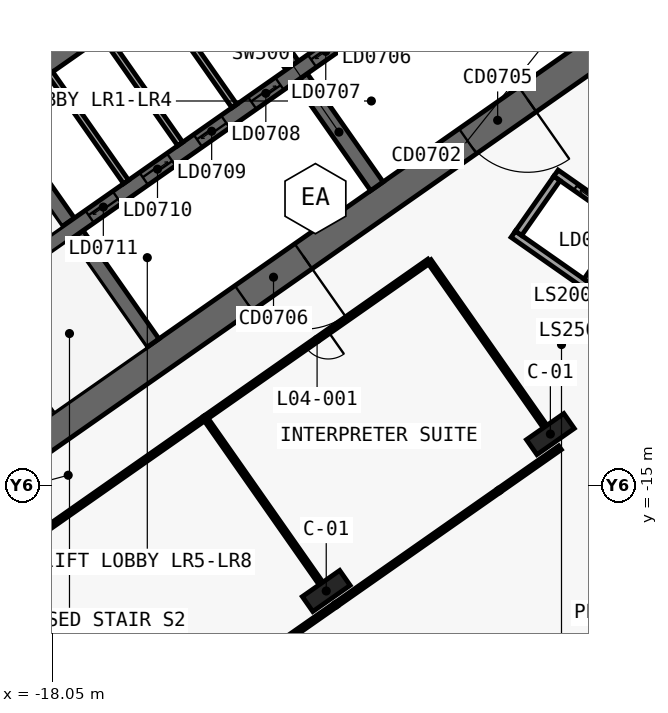
"""IFC4 building model, lengths in metres.
Left out: names, types, materials, properties, quantities, classifications, styles, units other than length and angle.
Written with IfcOpenShell. Run it as: python <this file> out.ifc"""

import sys

from ifc_helpers import new_model, si_unit, direction, frame, frame_2d, origin, origin_2d, place, context, subcontext, project, spatial, polyline, rectangle, outline, extrude, element, fill, save


model = new_model("IFC4")
c1 = context("Model", 3, precision=1e-05, world=origin(), true_north=direction((0.0, 1.0)))
c2 = subcontext(c1, "Body", "Model", "MODEL_VIEW")
j1 = project(units=[si_unit("LENGTHUNIT", "METRE"), si_unit("PLANEANGLEUNIT", "RADIAN")], contexts=[c1])
p1 = place(None, origin())
s1 = spatial("IfcSite", under=j1, at=p1, CompositionType="ELEMENT")
p2 = place(p1, origin())
s2 = spatial("IfcBuilding", under=s1, at=p2, CompositionType="ELEMENT")
p3 = place(p2, frame((0.0, 0.0, 32.0)))
s3 = spatial("IfcBuildingStorey", under=s2, at=p3, CompositionType="ELEMENT", Elevation=32.0)
p4 = place(p3, frame((0.037, 11.867, 0.0), z_axis=(0.0, 0.0, 1.0), x_axis=(-0.819155306259, -0.573571777746, 0.0)))
e1 = element("IfcWall", 1, at=p4, inside=s3, PredefinedType="SHEAR", context=c2, shape_type="SweptSolid", body=[
    extrude(outline(polyline([(33.837, 0.5), (0.7, 0.5), (0.0, -0.5), (33.837, -0.5), (33.837, 0.5)])), origin(), (0.0, 0.0, 1.0), 5.5),
])
p5 = place(p3, frame((0.037, -0.585, 0.0), z_axis=(0.0, 0.0, 1.0), x_axis=(-0.819157152511, -0.573569140985, 0.0)))
e2 = element("IfcWall", 2, at=p5, inside=s3, PredefinedType="SHEAR", context=c2, shape_type="SweptSolid", body=[
    extrude(outline(polyline([(26.695, 0.5), (0.7, 0.5), (0.0, -0.5), (26.695, -0.5), (26.695, 0.5)])), origin(), (0.0, 0.0, 1.0), 5.5),
])
p6 = place(p5, frame((2.995, 0.0, 0.0)))
e3 = element("IfcOpeningElement", 3, at=p6, cuts=e2, PredefinedType="OPENING", context=c2, shape_type="SweptSolid", body=[
    extrude(rectangle(XDim=2.4, YDim=2.1, at=frame_2d((1.2, 1.05))), frame((0.0, 0.51, 0.0), z_axis=(0.0, -1.0, 0.0), x_axis=(1.0, 0.0, 0.0)), (0.0, 0.0, 1.0), 1.02),
])
p7 = place(p5, frame((11.995, 0.0, 0.0)))
e4 = element("IfcOpeningElement", 4, at=p7, cuts=e2, PredefinedType="OPENING", context=c2, shape_type="SweptSolid", body=[
    extrude(rectangle(XDim=2.4, YDim=2.1, at=frame_2d((1.2, 1.05))), frame((0.0, 0.51, 0.0), z_axis=(0.0, -1.0, 0.0), x_axis=(1.0, 0.0, 0.0)), (0.0, 0.0, 1.0), 1.02),
])
p8 = place(p3, frame((-7.372, -5.162, 0.0), z_axis=(0.0, 0.0, 1.0), x_axis=(-0.573594173421, 0.819139624372, 0.0)))
e5 = element("IfcWall", 5, at=p8, inside=s3, PredefinedType="SHEAR", context=c2, shape_type="SweptSolid", body=[
    extrude(outline(polyline([(4.35, 0.25), (0.0, 0.25), (0.0, -0.25), (4.35, -0.25), (4.35, 0.25)])), origin(), (0.0, 0.0, 1.0), 5.5),
])
p9 = place(p3, frame((-10.154, -1.189, 0.0), z_axis=(0.0, 0.0, 1.0), x_axis=(-0.573594173421, 0.819139624372, 0.0)))
e6 = element("IfcWall", 6, at=p9, inside=s3, PredefinedType="SHEAR", context=c2, shape_type="SweptSolid", body=[
    extrude(outline(polyline([(4.35, -0.25), (4.35, 0.25), (-0.0, 0.25), (-0.0, -0.25), (4.35, -0.25)])), origin(), (0.0, 0.0, 1.0), 5.5),
])
p10 = place(p3, frame((-14.745, -10.324, 0.0), z_axis=(0.0, 0.0, 1.0), x_axis=(-0.57356780395, 0.819158088694, 0.0)))
e7 = element("IfcWall", 7, at=p10, inside=s3, PredefinedType="SHEAR", context=c2, shape_type="SweptSolid", body=[
    extrude(outline(polyline([(4.35, 0.25), (0.0, 0.25), (0.0, -0.25), (4.35, -0.25), (4.35, 0.25)])), origin(), (0.0, 0.0, 1.0), 5.5),
])
p11 = place(p3, frame((-17.527, -6.352, 0.0), z_axis=(0.0, 0.0, 1.0), x_axis=(-0.573530143085, 0.819184457233, 0.0)))
e8 = element("IfcWall", 8, at=p11, inside=s3, PredefinedType="SHEAR", context=c2, shape_type="SweptSolid", body=[
    extrude(outline(polyline([(4.35, -0.25), (4.35, 0.25), (0.0, 0.25), (0.0, -0.25), (4.35, -0.25)])), origin(), (0.0, 0.0, 1.0), 5.5),
])
p12 = place(p3, frame((-2.638, 3.768, 0.0), z_axis=(0.0, 0.0, 1.0), x_axis=(-0.819148977158, -0.573580816643, 0.0)))
e9 = element("IfcWall", 9, at=p12, inside=s3, PredefinedType="SHEAR", context=c2, shape_type="SweptSolid", body=[
    extrude(outline(polyline([(26.0, 0.25), (0.0, 0.25), (0.0, -0.25), (26.0, -0.25), (26.0, 0.25)])), origin(), (0.0, 0.0, 1.0), 5.5),
])
p13 = place(p12, frame((1.169, 0.0, 0.0)))
e10 = element("IfcOpeningElement", 10, at=p13, cuts=e9, PredefinedType="OPENING", context=c2, shape_type="SweptSolid", body=[
    extrude(rectangle(XDim=1.1, YDim=2.1, at=frame_2d((0.55, 1.05))), frame((0.0, 0.26, 0.0), z_axis=(0.0, -1.0, 0.0), x_axis=(1.0, 0.0, 0.0)), (0.0, 0.0, 1.0), 0.52),
])
p14 = place(p12, frame((3.206, 0.0, 0.0)))
e11 = element("IfcOpeningElement", 11, at=p14, cuts=e9, PredefinedType="OPENING", context=c2, shape_type="SweptSolid", body=[
    extrude(rectangle(XDim=1.1, YDim=2.1, at=frame_2d((0.55, 1.05))), frame((0.0, 0.26, 0.0), z_axis=(0.0, -1.0, 0.0), x_axis=(1.0, 0.0, 0.0)), (0.0, 0.0, 1.0), 0.52),
])
p15 = place(p12, frame((5.244, 0.0, 0.0)))
e12 = element("IfcOpeningElement", 12, at=p15, cuts=e9, PredefinedType="OPENING", context=c2, shape_type="SweptSolid", body=[
    extrude(rectangle(XDim=1.1, YDim=2.1, at=frame_2d((0.55, 1.05))), frame((0.0, 0.26, 0.0), z_axis=(0.0, -1.0, 0.0), x_axis=(1.0, 0.0, 0.0)), (0.0, 0.0, 1.0), 0.52),
])
p16 = place(p12, frame((7.281, 0.0, 0.0)))
e13 = element("IfcOpeningElement", 13, at=p16, cuts=e9, PredefinedType="OPENING", context=c2, shape_type="SweptSolid", body=[
    extrude(rectangle(XDim=1.1, YDim=2.1, at=frame_2d((0.55, 1.05))), frame((0.0, 0.26, 0.0), z_axis=(0.0, -1.0, 0.0), x_axis=(1.0, 0.0, 0.0)), (0.0, 0.0, 1.0), 0.52),
])
p17 = place(p12, frame((9.688, 0.0, 0.0)))
e14 = element("IfcOpeningElement", 14, at=p17, cuts=e9, PredefinedType="OPENING", context=c2, shape_type="SweptSolid", body=[
    extrude(rectangle(XDim=1.1, YDim=2.1, at=frame_2d((0.55, 1.05))), frame((0.0, 0.26, 0.0), z_axis=(0.0, -1.0, 0.0), x_axis=(1.0, 0.0, 0.0)), (0.0, 0.0, 1.0), 0.52),
])
p18 = place(p12, frame((11.863, 0.0, 0.0)))
e15 = element("IfcOpeningElement", 15, at=p18, cuts=e9, PredefinedType="OPENING", context=c2, shape_type="SweptSolid", body=[
    extrude(rectangle(XDim=1.1, YDim=2.1, at=frame_2d((0.55, 1.05))), frame((0.0, 0.26, 0.0), z_axis=(0.0, -1.0, 0.0), x_axis=(1.0, 0.0, 0.0)), (0.0, 0.0, 1.0), 0.52),
])
p19 = place(p12, frame((14.038, 0.0, 0.0)))
e16 = element("IfcOpeningElement", 16, at=p19, cuts=e9, PredefinedType="OPENING", context=c2, shape_type="SweptSolid", body=[
    extrude(rectangle(XDim=1.1, YDim=2.1, at=frame_2d((0.55, 1.05))), frame((0.0, 0.26, 0.0), z_axis=(0.0, -1.0, 0.0), x_axis=(1.0, 0.0, 0.0)), (0.0, 0.0, 1.0), 0.52),
])
p20 = place(p12, frame((16.212, 0.0, 0.0)))
e17 = element("IfcOpeningElement", 17, at=p20, cuts=e9, PredefinedType="OPENING", context=c2, shape_type="SweptSolid", body=[
    extrude(rectangle(XDim=1.1, YDim=2.1, at=frame_2d((0.55, 1.05))), frame((0.0, 0.26, 0.0), z_axis=(0.0, -1.0, 0.0), x_axis=(1.0, 0.0, 0.0)), (0.0, 0.0, 1.0), 0.52),
])
for number, where, z_axis, x_axis in (
    (18, (-1.665, -13.313, 0.0), (0.0, 0.0, 1.0), (-0.819, -0.574, 0.0)),
    (19, (-9.038, -18.475, 0.0), (0.0, 0.0, 1.0), (-0.819, -0.574, 0.0)),
):
    element("IfcColumn", number, at=place(p3, frame(where, z_axis=z_axis, x_axis=x_axis)), inside=s3, PredefinedType="COLUMN", context=c2, shape_type="SweptSolid", body=[
        extrude(rectangle(XDim=1.5, YDim=0.6, at=origin_2d()), origin(), (0.0, 0.0, 1.0), 5.5),
    ])
p21 = place(p3, frame((-12.059, -2.523, 0.0), z_axis=(0.0, 0.0, 1.0), x_axis=(-0.573594173421, 0.819139624372, 0.0)))
e20 = element("IfcWall", 20, at=p21, inside=s3, PredefinedType="SOLIDWALL", context=c2, shape_type="SweptSolid", body=[
    extrude(rectangle(XDim=4.35, YDim=0.2, at=frame_2d((2.175, 0.0))), origin(), (0.0, 0.0, 1.0), 5.5),
])
p22 = place(p3, frame((-13.84, -3.771, 0.0), z_axis=(0.0, 0.0, 1.0), x_axis=(-0.57356780395, 0.819158088694, 0.0)))
e21 = element("IfcWall", 21, at=p22, inside=s3, PredefinedType="SOLIDWALL", context=c2, shape_type="SweptSolid", body=[
    extrude(rectangle(XDim=4.35, YDim=0.2, at=frame_2d((2.175, 0.0))), origin(), (0.0, 0.0, 1.0), 5.5),
])
p23 = place(p3, frame((-15.622, -5.018, 0.0), z_axis=(0.0, 0.0, 1.0), x_axis=(-0.573594173421, 0.819139624372, 0.0)))
e22 = element("IfcWall", 22, at=p23, inside=s3, PredefinedType="SOLIDWALL", context=c2, shape_type="SweptSolid", body=[
    extrude(rectangle(XDim=4.35, YDim=0.2, at=frame_2d((2.175, 0.0))), origin(), (0.0, 0.0, 1.0), 5.5),
])
p24 = place(p3, frame((-2.887, -6.738, 0.0), z_axis=(0.0, 0.0, 1.0), x_axis=(0.819150280716, -0.573578954985, 0.0)))
e23 = element("IfcWall", 23, at=p24, inside=s3, PredefinedType="SOLIDWALL", context=c2, shape_type="SweptSolid", body=[
    extrude(rectangle(XDim=11.1, YDim=0.25, at=frame_2d((5.55, 0.0))), origin(), (0.0, 0.0, 1.0), 5.5),
])
p25 = place(p3, frame((-1.481, -4.731, 0.0), z_axis=(0.0, 0.0, 1.0), x_axis=(0.819150280716, -0.573578954985, 0.0)))
e24 = element("IfcWall", 24, at=p25, inside=s3, PredefinedType="SOLIDWALL", context=c2, shape_type="SweptSolid", body=[
    extrude(rectangle(XDim=11.1, YDim=0.25, at=frame_2d((5.55, 0.0))), origin(), (0.0, 0.0, 1.0), 5.5),
])
p26 = place(p25, frame((0.8, 0.0, 0.0)))
e25 = element("IfcOpeningElement", 25, at=p26, cuts=e24, PredefinedType="OPENING", context=c2, shape_type="SweptSolid", body=[
    extrude(rectangle(XDim=1.4, YDim=2.1, at=frame_2d((0.7, 1.05))), frame((0.0, 0.135, 0.0), z_axis=(0.0, -1.0, 0.0), x_axis=(1.0, 0.0, 0.0)), (0.0, 0.0, 1.0), 0.27),
])
p27 = place(p25, frame((3.5, 0.0, 0.0)))
e26 = element("IfcOpeningElement", 26, at=p27, cuts=e24, PredefinedType="OPENING", context=c2, shape_type="SweptSolid", body=[
    extrude(rectangle(XDim=1.4, YDim=2.1, at=frame_2d((0.7, 1.05))), frame((0.0, 0.135, 0.0), z_axis=(0.0, -1.0, 0.0), x_axis=(1.0, 0.0, 0.0)), (0.0, 0.0, 1.0), 0.27),
])
p28 = place(p25, frame((6.2, 0.0, 0.0)))
e27 = element("IfcOpeningElement", 27, at=p28, cuts=e24, PredefinedType="OPENING", context=c2, shape_type="SweptSolid", body=[
    extrude(rectangle(XDim=1.4, YDim=2.1, at=frame_2d((0.7, 1.05))), frame((0.0, 0.135, 0.0), z_axis=(0.0, -1.0, 0.0), x_axis=(1.0, 0.0, 0.0)), (0.0, 0.0, 1.0), 0.27),
])
p29 = place(p25, frame((8.9, 0.0, 0.0)))
e28 = element("IfcOpeningElement", 28, at=p29, cuts=e24, PredefinedType="OPENING", context=c2, shape_type="SweptSolid", body=[
    extrude(rectangle(XDim=1.4, YDim=2.1, at=frame_2d((0.7, 1.05))), frame((0.0, 0.135, 0.0), z_axis=(0.0, -1.0, 0.0), x_axis=(1.0, 0.0, 0.0)), (0.0, 0.0, 1.0), 0.27),
])
p30 = place(p3, frame((-2.713, -6.707, 0.0), z_axis=(0.0, 0.0, 1.0), x_axis=(0.573581496053, 0.819148501424, 0.0)))
e29 = element("IfcWall", 29, at=p30, inside=s3, PredefinedType="SOLIDWALL", context=c2, shape_type="SweptSolid", body=[
    extrude(rectangle(XDim=2.2, YDim=0.25, at=frame_2d((1.1, 0.0))), origin(), (0.0, 0.0, 1.0), 5.5),
])
p31 = place(p3, frame((-0.48, -8.27, 0.0), z_axis=(0.0, 0.0, 1.0), x_axis=(0.573633636671, 0.819111989218, 0.0)))
e30 = element("IfcWall", 30, at=p31, inside=s3, PredefinedType="SOLIDWALL", context=c2, shape_type="SweptSolid", body=[
    extrude(rectangle(XDim=2.2, YDim=0.2, at=frame_2d((1.1, 0.0))), origin(), (0.0, 0.0, 1.0), 5.5),
])
p32 = place(p3, frame((-27.966, -2.064, 0.0), z_axis=(0.0, 0.0, 1.0), x_axis=(0.819149627982, 0.57357988718, 0.0)))
e31 = element("IfcWall", 31, at=p32, inside=s3, PredefinedType="SOLIDWALL", context=c2, shape_type="SweptSolid", body=[
    extrude(rectangle(XDim=34.29, YDim=0.3, at=frame_2d((17.145, 0.0))), origin(), (0.0, 0.0, 1.0), 5.22),
])
p33 = place(p32, frame((3.567, 0.0, 1.0)))
e32 = element("IfcOpeningElement", 32, at=p33, cuts=e31, PredefinedType="OPENING", context=c2, shape_type="SweptSolid", body=[
    extrude(rectangle(XDim=2.217, YDim=3.62, at=frame_2d((1.109, 1.81))), frame((0.0, 0.16, 0.0), z_axis=(0.0, -1.0, 0.0), x_axis=(1.0, 0.0, 0.0)), (0.0, 0.0, 1.0), 0.32),
])
p34 = place(p32, frame((6.685, 0.0, 1.0)))
e33 = element("IfcOpeningElement", 33, at=p34, cuts=e31, PredefinedType="OPENING", context=c2, shape_type="SweptSolid", body=[
    extrude(rectangle(XDim=2.217, YDim=3.62, at=frame_2d((1.109, 1.81))), frame((0.0, 0.16, 0.0), z_axis=(0.0, -1.0, 0.0), x_axis=(1.0, 0.0, 0.0)), (0.0, 0.0, 1.0), 0.32),
])
p35 = place(p32, frame((9.802, 0.0, 1.0)))
e34 = element("IfcOpeningElement", 34, at=p35, cuts=e31, PredefinedType="OPENING", context=c2, shape_type="SweptSolid", body=[
    extrude(rectangle(XDim=2.217, YDim=3.62, at=frame_2d((1.109, 1.81))), frame((0.0, 0.16, 0.0), z_axis=(0.0, -1.0, 0.0), x_axis=(1.0, 0.0, 0.0)), (0.0, 0.0, 1.0), 0.32),
])
p36 = place(p32, frame((12.919, 0.0, 1.0)))
e35 = element("IfcOpeningElement", 35, at=p36, cuts=e31, PredefinedType="OPENING", context=c2, shape_type="SweptSolid", body=[
    extrude(rectangle(XDim=2.217, YDim=3.62, at=frame_2d((1.109, 1.81))), frame((0.0, 0.16, 0.0), z_axis=(0.0, -1.0, 0.0), x_axis=(1.0, 0.0, 0.0)), (0.0, 0.0, 1.0), 0.32),
])
p37 = place(p32, frame((16.037, 0.0, 1.0)))
e36 = element("IfcOpeningElement", 36, at=p37, cuts=e31, PredefinedType="OPENING", context=c2, shape_type="SweptSolid", body=[
    extrude(rectangle(XDim=2.217, YDim=3.62, at=frame_2d((1.109, 1.81))), frame((0.0, 0.16, 0.0), z_axis=(0.0, -1.0, 0.0), x_axis=(1.0, 0.0, 0.0)), (0.0, 0.0, 1.0), 0.32),
])
p38 = place(p32, frame((19.154, 0.0, 1.0)))
e37 = element("IfcOpeningElement", 37, at=p38, cuts=e31, PredefinedType="OPENING", context=c2, shape_type="SweptSolid", body=[
    extrude(rectangle(XDim=2.217, YDim=3.62, at=frame_2d((1.109, 1.81))), frame((0.0, 0.16, 0.0), z_axis=(0.0, -1.0, 0.0), x_axis=(1.0, 0.0, 0.0)), (0.0, 0.0, 1.0), 0.32),
])
p39 = place(p32, frame((22.271, 0.0, 1.0)))
e38 = element("IfcOpeningElement", 38, at=p39, cuts=e31, PredefinedType="OPENING", context=c2, shape_type="SweptSolid", body=[
    extrude(rectangle(XDim=2.217, YDim=3.62, at=frame_2d((1.109, 1.81))), frame((0.0, 0.16, 0.0), z_axis=(0.0, -1.0, 0.0), x_axis=(1.0, 0.0, 0.0)), (0.0, 0.0, 1.0), 0.32),
])
p40 = place(p32, frame((25.388, 0.0, 1.0)))
e39 = element("IfcOpeningElement", 39, at=p40, cuts=e31, PredefinedType="OPENING", context=c2, shape_type="SweptSolid", body=[
    extrude(rectangle(XDim=2.217, YDim=3.62, at=frame_2d((1.109, 1.81))), frame((0.0, 0.16, 0.0), z_axis=(0.0, -1.0, 0.0), x_axis=(1.0, 0.0, 0.0)), (0.0, 0.0, 1.0), 0.32),
])
p41 = place(p32, frame((28.506, 0.0, 1.0)))
e40 = element("IfcOpeningElement", 40, at=p41, cuts=e31, PredefinedType="OPENING", context=c2, shape_type="SweptSolid", body=[
    extrude(rectangle(XDim=2.217, YDim=3.62, at=frame_2d((1.109, 1.81))), frame((0.0, 0.16, 0.0), z_axis=(0.0, -1.0, 0.0), x_axis=(1.0, 0.0, 0.0)), (0.0, 0.0, 1.0), 0.32),
])
p42 = place(p3, frame((-5.652, -7.62, 0.0), z_axis=(0.0, 0.0, 1.0), x_axis=(-0.81915291695, -0.57357519006, 0.0)))
e41 = element("IfcWall", 41, at=p42, inside=s3, PredefinedType="PARTITIONING", context=c2, shape_type="SweptSolid", body=[
    extrude(rectangle(XDim=9.002, YDim=0.15, at=frame_2d((4.501, 0.0))), origin(), (0.0, 0.0, 1.0), 3.68),
])
p43 = place(p42, frame((4.051, 0.0, 0.0)))
e42 = element("IfcOpeningElement", 42, at=p43, cuts=e41, PredefinedType="OPENING", context=c2, shape_type="SweptSolid", body=[
    extrude(rectangle(XDim=0.9, YDim=2.1, at=frame_2d((0.45, 1.05))), frame((0.0, 0.085, 0.0), z_axis=(0.0, -1.0, 0.0), x_axis=(1.0, 0.0, 0.0)), (0.0, 0.0, 1.0), 0.17),
])
p44 = place(p3, frame((-13.022, -12.781, 0.0), z_axis=(0.0, 0.0, 1.0), x_axis=(-0.819154688631, -0.57357265982, 0.0)))
e43 = element("IfcWall", 43, at=p44, inside=s3, PredefinedType="PARTITIONING", context=c2, shape_type="SweptSolid", body=[
    extrude(rectangle(XDim=30.002, YDim=0.15, at=frame_2d((15.001, 0.0))), origin(), (0.0, 0.0, 1.0), 3.68),
])
p45 = place(p44, frame((14.551, 0.0, 0.0)))
e44 = element("IfcOpeningElement", 44, at=p45, cuts=e43, PredefinedType="OPENING", context=c2, shape_type="SweptSolid", body=[
    extrude(rectangle(XDim=0.9, YDim=2.1, at=frame_2d((0.45, 1.05))), frame((0.0, 0.085, 0.0), z_axis=(0.0, -1.0, 0.0), x_axis=(1.0, 0.0, 0.0)), (0.0, 0.0, 1.0), 0.17),
])
p46 = place(p3, frame((-8.723, -18.927, 0.0), z_axis=(0.0, 0.0, 1.0), x_axis=(0.81913387212, 0.573602388024, 0.0)))
e45 = element("IfcWall", 45, at=p46, inside=s3, PredefinedType="PARTITIONING", context=c2, shape_type="SweptSolid", body=[
    extrude(rectangle(XDim=6.552, YDim=0.15, at=frame_2d((3.276, 0.0))), origin(), (0.0, 0.0, 1.0), 5.1),
])
p47 = place(p3, frame((-30.839, -34.413, 0.0), z_axis=(0.0, 0.0, 1.0), x_axis=(0.819150779762, 0.573578242279, 0.0)))
e46 = element("IfcWall", 46, at=p47, inside=s3, PredefinedType="PARTITIONING", context=c2, shape_type="SweptSolid", body=[
    extrude(rectangle(XDim=27.002, YDim=0.15, at=frame_2d((13.501, 0.0))), origin(), (0.0, 0.0, 1.0), 4.08),
])
p48 = place(p3, frame((-3.355, -15.169, 0.0), z_axis=(0.0, 0.0, 1.0), x_axis=(0.819157023945, 0.573569324599, 0.0)))
e47 = element("IfcWall", 47, at=p48, inside=s3, PredefinedType="PARTITIONING", context=c2, shape_type="SweptSolid", body=[
    extrude(rectangle(XDim=2.45, YDim=0.15, at=frame_2d((1.225, 0.0))), origin(), (0.0, 0.0, 1.0), 5.1),
])
p49 = place(p3, frame((-1.849, -13.051, 0.0), z_axis=(0.0, 0.0, 1.0), x_axis=(-0.573575988258, 0.819152358047, 0.0)))
e48 = element("IfcWall", 48, at=p49, inside=s3, PredefinedType="PARTITIONING", context=c2, shape_type="SweptSolid", body=[
    extrude(rectangle(XDim=6.632, YDim=0.15, at=frame_2d((3.316, 0.0))), origin(), (0.0, 0.0, 1.0), 3.68),
])
p50 = place(p3, frame((-9.221, -18.213, 0.0), z_axis=(0.0, 0.0, 1.0), x_axis=(-0.573556251799, 0.819166177294, 0.0)))
e49 = element("IfcWall", 49, at=p50, inside=s3, PredefinedType="PARTITIONING", context=c2, shape_type="SweptSolid", body=[
    extrude(rectangle(XDim=6.63, YDim=0.15, at=frame_2d((3.315, 0.0))), origin(), (0.0, 0.0, 1.0), 3.68),
])
p51 = place(p16, origin())
e50 = element("IfcDoor", 50, at=p51, inside=s3, OperationType="SLIDING_TO_RIGHT", PredefinedType="DOOR", context=c2, shape_type="SweptSolid", body=[
    extrude(rectangle(XDim=1.1, YDim=2.1, at=frame_2d((0.55, 1.05))), frame((0.0, 0.025, 0.0), z_axis=(0.0, -1.0, 0.0), x_axis=(1.0, 0.0, 0.0)), (0.0, 0.0, 1.0), 0.05),
])
fill(e13, e50)
p52 = place(p17, origin())
e51 = element("IfcDoor", 51, at=p52, inside=s3, OperationType="SLIDING_TO_LEFT", PredefinedType="DOOR", context=c2, shape_type="SweptSolid", body=[
    extrude(rectangle(XDim=1.1, YDim=2.1, at=frame_2d((0.55, 1.05))), frame((0.0, 0.025, 0.0), z_axis=(0.0, -1.0, 0.0), x_axis=(1.0, 0.0, 0.0)), (0.0, 0.0, 1.0), 0.05),
])
fill(e14, e51)
p53 = place(p18, origin())
e52 = element("IfcDoor", 52, at=p53, inside=s3, OperationType="SLIDING_TO_RIGHT", PredefinedType="DOOR", context=c2, shape_type="SweptSolid", body=[
    extrude(rectangle(XDim=1.1, YDim=2.1, at=frame_2d((0.55, 1.05))), frame((0.0, 0.025, 0.0), z_axis=(0.0, -1.0, 0.0), x_axis=(1.0, 0.0, 0.0)), (0.0, 0.0, 1.0), 0.05),
])
fill(e15, e52)
p54 = place(p19, origin())
e53 = element("IfcDoor", 53, at=p54, inside=s3, OperationType="SLIDING_TO_LEFT", PredefinedType="DOOR", context=c2, shape_type="SweptSolid", body=[
    extrude(rectangle(XDim=1.1, YDim=2.1, at=frame_2d((0.55, 1.05))), frame((0.0, 0.025, 0.0), z_axis=(0.0, -1.0, 0.0), x_axis=(1.0, 0.0, 0.0)), (0.0, 0.0, 1.0), 0.05),
])
fill(e16, e53)
p55 = place(p20, origin())
e54 = element("IfcDoor", 54, at=p55, inside=s3, OperationType="SLIDING_TO_RIGHT", PredefinedType="DOOR", context=c2, shape_type="SweptSolid", body=[
    extrude(rectangle(XDim=1.1, YDim=2.1, at=frame_2d((0.55, 1.05))), frame((0.0, 0.025, 0.0), z_axis=(0.0, -1.0, 0.0), x_axis=(1.0, 0.0, 0.0)), (0.0, 0.0, 1.0), 0.05),
])
fill(e17, e54)
p56 = place(p6, origin())
e55 = element("IfcDoor", 55, at=p56, inside=s3, OperationType="DOUBLE_DOOR_SINGLE_SWING", PredefinedType="DOOR", context=c2, shape_type="SweptSolid", body=[
    extrude(rectangle(XDim=2.4, YDim=2.1, at=frame_2d((1.2, 1.05))), frame((0.0, 0.025, 0.0), z_axis=(0.0, -1.0, 0.0), x_axis=(1.0, 0.0, 0.0)), (0.0, 0.0, 1.0), 0.05),
])
fill(e3, e55)
p57 = place(p7, origin())
e56 = element("IfcDoor", 56, at=p57, inside=s3, OperationType="DOUBLE_DOOR_SINGLE_SWING", PredefinedType="DOOR", context=c2, shape_type="SweptSolid", body=[
    extrude(rectangle(XDim=2.4, YDim=2.1, at=frame_2d((1.2, 1.05))), frame((0.0, 0.025, 0.0), z_axis=(0.0, -1.0, 0.0), x_axis=(1.0, 0.0, 0.0)), (0.0, 0.0, 1.0), 0.05),
])
fill(e4, e56)
p58 = place(p26, origin())
e57 = element("IfcDoor", 57, at=p58, inside=s3, OperationType="SLIDING_TO_LEFT", PredefinedType="DOOR", context=c2, shape_type="SweptSolid", body=[
    extrude(rectangle(XDim=1.4, YDim=2.1, at=frame_2d((0.7, 1.05))), frame((0.0, 0.025, 0.0), z_axis=(0.0, -1.0, 0.0), x_axis=(1.0, 0.0, 0.0)), (0.0, 0.0, 1.0), 0.05),
])
fill(e25, e57)
p59 = place(p43, origin())
e58 = element("IfcDoor", 58, at=p59, inside=s3, OperationType="SINGLE_SWING_RIGHT", PredefinedType="DOOR", context=c2, shape_type="SweptSolid", body=[
    extrude(rectangle(XDim=0.9, YDim=2.1, at=frame_2d((0.45, 1.05))), frame((0.0, 0.025, 0.0), z_axis=(0.0, -1.0, 0.0), x_axis=(1.0, 0.0, 0.0)), (0.0, 0.0, 1.0), 0.05),
])
fill(e42, e58)
save(model, sys.argv[1])
